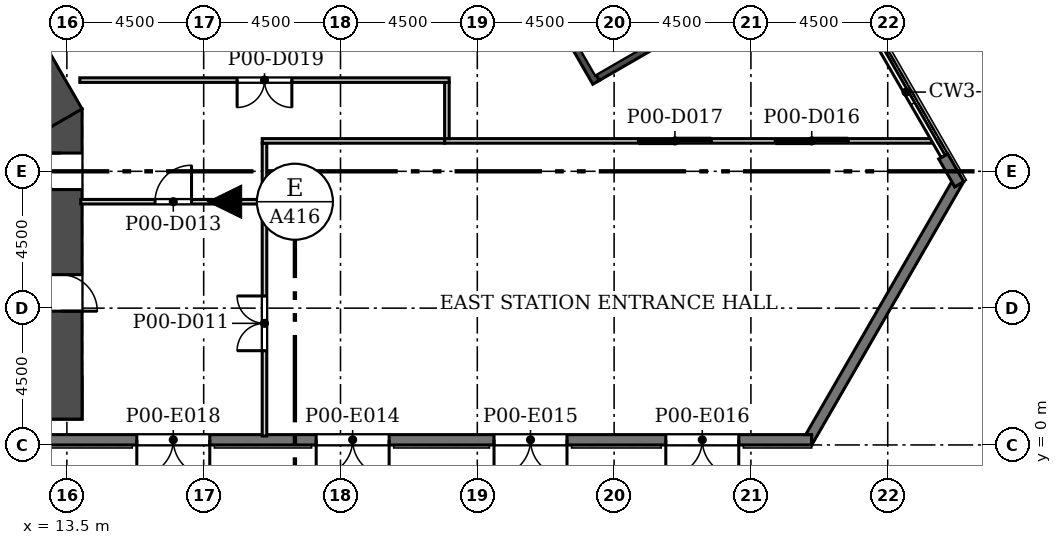
"""IFC4 building model, lengths in metres.
Left out: names, types, materials, properties, quantities, classifications, styles, units other than length and angle.
Written with IfcOpenShell. Run it as: python <this file> out.ifc"""

import sys

from ifc_helpers import new_model, si_unit, direction, frame, frame_2d, origin, place, context, subcontext, project, spatial, polyline, rectangle, outline, extrude, element, fill, save


model = new_model("IFC4")
c1 = context("Model", 3, precision=1e-05, world=origin(), true_north=direction((0.0, 1.0)))
c2 = subcontext(c1, "Body", "Model", "MODEL_VIEW")
j1 = project(units=[si_unit("LENGTHUNIT", "METRE"), si_unit("PLANEANGLEUNIT", "RADIAN")], contexts=[c1])
p1 = place(None, origin())
s1 = spatial("IfcSite", under=j1, at=p1, CompositionType="ELEMENT")
p2 = place(p1, origin())
s2 = spatial("IfcBuilding", under=s1, at=p2, CompositionType="ELEMENT")
p3 = place(p2, origin())
s3 = spatial("IfcBuildingStorey", under=s2, at=p3, CompositionType="ELEMENT", Elevation=0.0)
p4 = place(p3, frame((-14.0, 1.55, 0.0), z_axis=(0.0, 0.0, 1.0), x_axis=(1.0, 0.0, 0.0)))
e1 = element("IfcWall", 1, at=p4, inside=s3, PredefinedType="SHEAR", context=c2, shape_type="SweptSolid", body=[
    extrude(rectangle(XDim=28.0, YDim=1.4, at=frame_2d((14.0, 0.0))), origin(), (0.0, 0.0, 1.0), 8.0),
])
p5 = place(p3, frame((13.3, 0.85, 0.0), z_axis=(0.0, 0.0, 1.0), x_axis=(0.0, 1.0, 0.0)))
e2 = element("IfcWall", 2, at=p5, inside=s3, PredefinedType="SHEAR", context=c2, shape_type="SweptSolid", body=[
    extrude(rectangle(XDim=10.202, YDim=1.4, at=frame_2d((5.101, 0.0))), origin(), (0.0, 0.0, 1.0), 8.0),
])
p6 = place(p5, frame((3.55, 0.0, 0.0)))
e3 = element("IfcOpeningElement", 3, at=p6, cuts=e2, PredefinedType="OPENING", context=c2, shape_type="SweptSolid", body=[
    extrude(rectangle(XDim=1.2, YDim=2.1, at=frame_2d((0.6, 1.05))), frame((0.0, 0.71, 0.0), z_axis=(0.0, -1.0, 0.0), x_axis=(1.0, 0.0, 0.0)), (0.0, 0.0, 1.0), 1.42),
])
p7 = place(p5, frame((7.55, 0.0, 0.0)))
e4 = element("IfcOpeningElement", 4, at=p7, cuts=e2, PredefinedType="OPENING", context=c2, shape_type="SweptSolid", body=[
    extrude(rectangle(XDim=1.2, YDim=2.1, at=frame_2d((0.6, 1.05))), frame((0.0, 0.71, 0.0), z_axis=(0.0, -1.0, 0.0), x_axis=(1.0, 0.0, 0.0)), (0.0, 0.0, 1.0), 1.42),
])
p8 = place(p3, frame((13.394, 10.703, 0.0), z_axis=(0.0, 0.0, 1.0), x_axis=(-0.50000187635, 0.866024320471, 0.0)))
e5 = element("IfcWall", 5, at=p8, inside=s3, PredefinedType="SHEAR", context=c2, shape_type="SweptSolid", body=[
    extrude(rectangle(XDim=9.177, YDim=1.4, at=frame_2d((4.588, 0.0))), origin(), (0.0, 0.0, 1.0), 8.0),
])
p9 = place(p3, frame((-38.0, 0.17, 0.0), z_axis=(0.0, 0.0, 1.0), x_axis=(1.0, 0.0, 0.0)))
e6 = element("IfcWall", 6, at=p9, inside=s3, PredefinedType="SOLIDWALL", context=c2, shape_type="SweptSolid", body=[
    extrude(rectangle(XDim=76.0, YDim=0.34, at=frame_2d((38.0, 0.0))), origin(), (0.0, 0.0, 1.0), 7.7),
])
p10 = place(p9, frame((2.4, 0.0, 0.0)))
e7 = element("IfcOpeningElement", 7, at=p10, cuts=e6, PredefinedType="OPENING", context=c2, shape_type="SweptSolid", body=[
    extrude(rectangle(XDim=2.4, YDim=2.7, at=frame_2d((1.2, 1.35))), frame((0.0, 0.18, 0.0), z_axis=(0.0, -1.0, 0.0), x_axis=(1.0, 0.0, 0.0)), (0.0, 0.0, 1.0), 0.36),
])
p11 = place(p9, frame((8.05, 0.0, 0.0)))
e8 = element("IfcOpeningElement", 8, at=p11, cuts=e6, PredefinedType="OPENING", context=c2, shape_type="SweptSolid", body=[
    extrude(rectangle(XDim=2.4, YDim=2.7, at=frame_2d((1.2, 1.35))), frame((0.0, 0.18, 0.0), z_axis=(0.0, -1.0, 0.0), x_axis=(1.0, 0.0, 0.0)), (0.0, 0.0, 1.0), 0.36),
])
p12 = place(p9, frame((13.9, 0.0, 0.0)))
e9 = element("IfcOpeningElement", 9, at=p12, cuts=e6, PredefinedType="OPENING", context=c2, shape_type="SweptSolid", body=[
    extrude(rectangle(XDim=2.4, YDim=2.7, at=frame_2d((1.2, 1.35))), frame((0.0, 0.18, 0.0), z_axis=(0.0, -1.0, 0.0), x_axis=(1.0, 0.0, 0.0)), (0.0, 0.0, 1.0), 0.36),
])
p13 = place(p9, frame((59.7, 0.0, 0.0)))
e10 = element("IfcOpeningElement", 10, at=p13, cuts=e6, PredefinedType="OPENING", context=c2, shape_type="SweptSolid", body=[
    extrude(rectangle(XDim=2.4, YDim=2.7, at=frame_2d((1.2, 1.35))), frame((0.0, 0.18, 0.0), z_axis=(0.0, -1.0, 0.0), x_axis=(1.0, 0.0, 0.0)), (0.0, 0.0, 1.0), 0.36),
])
p14 = place(p9, frame((65.55, 0.0, 0.0)))
e11 = element("IfcOpeningElement", 11, at=p14, cuts=e6, PredefinedType="OPENING", context=c2, shape_type="SweptSolid", body=[
    extrude(rectangle(XDim=2.4, YDim=2.7, at=frame_2d((1.2, 1.35))), frame((0.0, 0.18, 0.0), z_axis=(0.0, -1.0, 0.0), x_axis=(1.0, 0.0, 0.0)), (0.0, 0.0, 1.0), 0.36),
])
p15 = place(p9, frame((71.2, 0.0, 0.0)))
e12 = element("IfcOpeningElement", 12, at=p15, cuts=e6, PredefinedType="OPENING", context=c2, shape_type="SweptSolid", body=[
    extrude(rectangle(XDim=2.4, YDim=2.7, at=frame_2d((1.2, 1.35))), frame((0.0, 0.18, 0.0), z_axis=(0.0, -1.0, 0.0), x_axis=(1.0, 0.0, 0.0)), (0.0, 0.0, 1.0), 0.36),
])
p16 = place(p9, frame((19.8, 0.0, 0.0)))
e13 = element("IfcOpeningElement", 13, at=p16, cuts=e6, PredefinedType="OPENING", context=c2, shape_type="SweptSolid", body=[
    extrude(rectangle(XDim=2.4, YDim=2.7, at=frame_2d((1.2, 1.35))), frame((0.0, 0.18, 0.0), z_axis=(0.0, -1.0, 0.0), x_axis=(1.0, 0.0, 0.0)), (0.0, 0.0, 1.0), 0.36),
])
p17 = place(p9, frame((53.8, 0.0, 0.0)))
e14 = element("IfcOpeningElement", 14, at=p17, cuts=e6, PredefinedType="OPENING", context=c2, shape_type="SweptSolid", body=[
    extrude(rectangle(XDim=2.4, YDim=2.7, at=frame_2d((1.2, 1.35))), frame((0.0, 0.18, 0.0), z_axis=(0.0, -1.0, 0.0), x_axis=(1.0, 0.0, 0.0)), (0.0, 0.0, 1.0), 0.36),
])
p18 = place(p3, origin())
e15 = element("IfcWall", 15, at=p18, inside=s3, PredefinedType="SOLIDWALL", context=c2, shape_type="SweptSolid", body=[
    extrude(outline(polyline([(38.0, -0.001), (38.0, 0.339), (37.803, 0.339), (42.607, 8.661), (42.706, 8.491), (43.001, 8.661), (43.001, 8.661), (38.0, -0.001), (38.0, -0.001)])), origin(), (0.0, 0.0, 1.0), 7.7),
])
p19 = place(p3, frame((42.853, 8.575, 0.0), z_axis=(0.0, 0.0, 1.0), x_axis=(-0.500062184469, 0.865989498588, 0.0)))
e16 = element("IfcWall", 16, at=p19, inside=s3, PredefinedType="SOLIDWALL", context=c2, shape_type="SweptSolid", body=[
    extrude(rectangle(XDim=1.057, YDim=0.34, at=frame_2d((0.529, 0.0))), origin(), (0.0, 0.0, 1.0), 7.7),
])
p20 = place(p3, frame((20.0, 0.295, 0.0), z_axis=(0.0, 0.0, 1.0), x_axis=(0.0, 1.0, 0.0)))
e17 = element("IfcWall", 17, at=p20, inside=s3, PredefinedType="PARTITIONING", context=c2, shape_type="SweptSolid", body=[
    extrude(rectangle(XDim=7.78, YDim=0.15, at=frame_2d((3.89, 0.0))), origin(), (0.0, 0.0, 1.0), 7.7),
])
p21 = place(p20, frame((2.805, 0.0, 0.0)))
e18 = element("IfcOpeningElement", 18, at=p21, cuts=e17, PredefinedType="OPENING", context=c2, shape_type="SweptSolid", body=[
    extrude(rectangle(XDim=1.8, YDim=2.1, at=frame_2d((0.9, 1.05))), frame((0.0, 0.085, 0.0), z_axis=(0.0, -1.0, 0.0), x_axis=(1.0, 0.0, 0.0)), (0.0, 0.0, 1.0), 0.17),
])
p22 = place(p3, frame((13.955, 8.0, 0.0), z_axis=(0.0, 0.0, 1.0), x_axis=(1.0, 0.0, 0.0)))
e19 = element("IfcWall", 19, at=p22, inside=s3, PredefinedType="PARTITIONING", context=c2, shape_type="SweptSolid", body=[
    extrude(rectangle(XDim=5.97, YDim=0.15, at=frame_2d((2.985, 0.0))), origin(), (0.0, 0.0, 1.0), 7.7),
])
p23 = place(p22, frame((2.445, 0.0, 0.0)))
e20 = element("IfcOpeningElement", 20, at=p23, cuts=e19, PredefinedType="OPENING", context=c2, shape_type="SweptSolid", body=[
    extrude(rectangle(XDim=1.2, YDim=2.1, at=frame_2d((0.6, 1.05))), frame((0.0, 0.085, 0.0), z_axis=(0.0, -1.0, 0.0), x_axis=(1.0, 0.0, 0.0)), (0.0, 0.0, 1.0), 0.17),
])
p24 = place(p3, frame((20.0, 8.075, 0.0), z_axis=(0.0, 0.0, 1.0), x_axis=(0.0, 1.0, 0.0)))
e21 = element("IfcWall", 21, at=p24, inside=s3, PredefinedType="PARTITIONING", context=c2, shape_type="SweptSolid", body=[
    extrude(rectangle(XDim=1.85, YDim=0.15, at=frame_2d((0.925, 0.0))), origin(), (0.0, 0.0, 1.0), 7.7),
])
p25 = place(p3, frame((19.925, 10.0, 0.0), z_axis=(0.0, 0.0, 1.0), x_axis=(1.0, 0.0, 0.0)))
e22 = element("IfcWall", 22, at=p25, inside=s3, PredefinedType="PARTITIONING", context=c2, shape_type="SweptSolid", body=[
    extrude(rectangle(XDim=6.0, YDim=0.15, at=frame_2d((3.0, 0.0))), origin(), (0.0, 0.0, 1.0), 7.7),
])
p26 = place(p3, frame((25.925, 10.0, 0.0), z_axis=(0.0, 0.0, 1.0), x_axis=(1.0, 0.0, 0.0)))
e23 = element("IfcWall", 23, at=p26, inside=s3, PredefinedType="PARTITIONING", context=c2, shape_type="SweptSolid", body=[
    extrude(rectangle(XDim=16.019, YDim=0.15, at=frame_2d((8.009, 0.0))), origin(), (0.0, 0.0, 1.0), 7.7),
])
p27 = place(p26, frame((10.875, 0.0, 0.0)))
e24 = element("IfcOpeningElement", 24, at=p27, cuts=e23, PredefinedType="OPENING", context=c2, shape_type="SweptSolid", body=[
    extrude(rectangle(XDim=2.4, YDim=2.4, at=frame_2d((1.2, 1.2))), frame((0.0, 0.085, 0.0), z_axis=(0.0, -1.0, 0.0), x_axis=(1.0, 0.0, 0.0)), (0.0, 0.0, 1.0), 0.17),
])
p28 = place(p26, frame((6.375, 0.0, 0.0)))
e25 = element("IfcOpeningElement", 25, at=p28, cuts=e23, PredefinedType="OPENING", context=c2, shape_type="SweptSolid", body=[
    extrude(rectangle(XDim=2.4, YDim=2.4, at=frame_2d((1.2, 1.2))), frame((0.0, 0.085, 0.0), z_axis=(0.0, -1.0, 0.0), x_axis=(1.0, 0.0, 0.0)), (0.0, 0.0, 1.0), 0.17),
])
p29 = place(p3, frame((26.0, 11.925, 0.0), z_axis=(0.0, 0.0, 1.0), x_axis=(0.0, -1.0, 0.0)))
e26 = element("IfcWall", 26, at=p29, inside=s3, PredefinedType="PARTITIONING", context=c2, shape_type="SweptSolid", body=[
    extrude(rectangle(XDim=1.85, YDim=0.15, at=frame_2d((0.925, 0.0))), origin(), (0.0, 0.0, 1.0), 7.7),
])
p30 = place(p3, frame((30.907, 11.927, 0.0), z_axis=(0.0, 0.0, 1.0), x_axis=(-0.499985572004, 0.866033733632, 0.0)))
e27 = element("IfcWall", 27, at=p30, inside=s3, PredefinedType="SOLIDWALL", context=c2, shape_type="SweptSolid", body=[
    extrude(rectangle(XDim=7.55, YDim=0.25, at=frame_2d((3.775, 0.0))), origin(), (0.0, 0.0, 1.0), 7.7),
])
p31 = place(p3, frame((13.925, 12.0, 0.0), z_axis=(0.0, 0.0, 1.0), x_axis=(1.0, 0.0, 0.0)))
e28 = element("IfcWall", 28, at=p31, inside=s3, PredefinedType="PARTITIONING", context=c2, shape_type="SweptSolid", body=[
    extrude(rectangle(XDim=12.15, YDim=0.15, at=frame_2d((6.075, 0.0))), origin(), (0.0, 0.0, 1.0), 7.7),
])
p32 = place(p31, frame((5.175, 0.0, 0.0)))
e29 = element("IfcOpeningElement", 29, at=p32, cuts=e28, PredefinedType="OPENING", context=c2, shape_type="SweptSolid", body=[
    extrude(rectangle(XDim=1.8, YDim=2.1, at=frame_2d((0.9, 1.05))), frame((0.0, 0.085, 0.0), z_axis=(0.0, -1.0, 0.0), x_axis=(1.0, 0.0, 0.0)), (0.0, 0.0, 1.0), 0.17),
])
p33 = place(p3, frame((36.452, 15.272, 0.0), z_axis=(0.0, 0.0, 1.0), x_axis=(-0.866041542834, -0.499972045304, 0.0)))
e30 = element("IfcWall", 30, at=p33, inside=s3, PredefinedType="SOLIDWALL", context=c2, shape_type="SweptSolid", body=[
    extrude(rectangle(XDim=6.35, YDim=0.25, at=frame_2d((3.175, 0.0))), origin(), (0.0, 0.0, 1.0), 7.7),
])
p34 = place(p13, frame((2.4, 0.0, 0.0), z_axis=(0.0, 0.0, 1.0), x_axis=(-1.0, 0.0, 0.0)))
e31 = element("IfcDoor", 31, at=p34, inside=s3, OperationType="DOUBLE_DOOR_SINGLE_SWING", PredefinedType="DOOR", context=c2, shape_type="SweptSolid", body=[
    extrude(rectangle(XDim=2.4, YDim=2.7, at=frame_2d((1.2, 1.35))), frame((0.0, 0.025, 0.0), z_axis=(0.0, -1.0, 0.0), x_axis=(1.0, 0.0, 0.0)), (0.0, 0.0, 1.0), 0.05),
])
fill(e10, e31)
p35 = place(p14, frame((2.4, 0.0, 0.0), z_axis=(0.0, 0.0, 1.0), x_axis=(-1.0, 0.0, 0.0)))
e32 = element("IfcDoor", 32, at=p35, inside=s3, OperationType="DOUBLE_DOOR_SINGLE_SWING", PredefinedType="DOOR", context=c2, shape_type="SweptSolid", body=[
    extrude(rectangle(XDim=2.4, YDim=2.7, at=frame_2d((1.2, 1.35))), frame((0.0, 0.025, 0.0), z_axis=(0.0, -1.0, 0.0), x_axis=(1.0, 0.0, 0.0)), (0.0, 0.0, 1.0), 0.05),
])
fill(e11, e32)
p36 = place(p15, frame((2.4, 0.0, 0.0), z_axis=(0.0, 0.0, 1.0), x_axis=(-1.0, 0.0, 0.0)))
e33 = element("IfcDoor", 33, at=p36, inside=s3, OperationType="DOUBLE_DOOR_SINGLE_SWING", PredefinedType="DOOR", context=c2, shape_type="SweptSolid", body=[
    extrude(rectangle(XDim=2.4, YDim=2.7, at=frame_2d((1.2, 1.35))), frame((0.0, 0.025, 0.0), z_axis=(0.0, -1.0, 0.0), x_axis=(1.0, 0.0, 0.0)), (0.0, 0.0, 1.0), 0.05),
])
fill(e12, e33)
p37 = place(p17, frame((2.4, 0.0, 0.0), z_axis=(0.0, 0.0, 1.0), x_axis=(-1.0, 0.0, 0.0)))
e34 = element("IfcDoor", 34, at=p37, inside=s3, OperationType="DOUBLE_DOOR_SINGLE_SWING", PredefinedType="DOOR", context=c2, shape_type="SweptSolid", body=[
    extrude(rectangle(XDim=2.4, YDim=2.7, at=frame_2d((1.2, 1.35))), frame((0.0, 0.025, 0.0), z_axis=(0.0, -1.0, 0.0), x_axis=(1.0, 0.0, 0.0)), (0.0, 0.0, 1.0), 0.05),
])
fill(e14, e34)
p38 = place(p6, frame((1.2, 0.0, 0.0), z_axis=(0.0, 0.0, 1.0), x_axis=(-1.0, 0.0, 0.0)))
e35 = element("IfcDoor", 35, at=p38, inside=s3, OperationType="SINGLE_SWING_RIGHT", PredefinedType="DOOR", context=c2, shape_type="SweptSolid", body=[
    extrude(rectangle(XDim=1.2, YDim=2.1, at=frame_2d((0.6, 1.05))), frame((0.0, 0.425, 0.0), z_axis=(0.0, -1.0, 0.0), x_axis=(1.0, 0.0, 0.0)), (0.0, 0.0, 1.0), 0.05),
])
fill(e3, e35)
p39 = place(p7, origin())
e36 = element("IfcDoor", 36, at=p39, inside=s3, OperationType="SINGLE_SWING_RIGHT", PredefinedType="DOOR", context=c2, shape_type="SweptSolid", body=[
    extrude(rectangle(XDim=1.2, YDim=2.1, at=frame_2d((0.6, 1.05))), frame((0.0, 0.025, 0.0), z_axis=(0.0, -1.0, 0.0), x_axis=(1.0, 0.0, 0.0)), (0.0, 0.0, 1.0), 0.05),
])
fill(e4, e36)
p40 = place(p21, origin())
e37 = element("IfcDoor", 37, at=p40, inside=s3, OperationType="DOUBLE_DOOR_SINGLE_SWING", PredefinedType="DOOR", context=c2, shape_type="SweptSolid", body=[
    extrude(rectangle(XDim=1.8, YDim=2.1, at=frame_2d((0.9, 1.05))), frame((0.0, 0.025, 0.0), z_axis=(0.0, -1.0, 0.0), x_axis=(1.0, 0.0, 0.0)), (0.0, 0.0, 1.0), 0.05),
])
fill(e18, e37)
p41 = place(p23, origin())
e38 = element("IfcDoor", 38, at=p41, inside=s3, OperationType="SINGLE_SWING_RIGHT", PredefinedType="DOOR", context=c2, shape_type="SweptSolid", body=[
    extrude(rectangle(XDim=1.2, YDim=2.1, at=frame_2d((0.6, 1.05))), frame((0.0, 0.025, 0.0), z_axis=(0.0, -1.0, 0.0), x_axis=(1.0, 0.0, 0.0)), (0.0, 0.0, 1.0), 0.05),
])
fill(e20, e38)
p42 = place(p27, origin())
e39 = element("IfcDoor", 39, at=p42, inside=s3, OperationType="DOUBLE_DOOR_SLIDING", PredefinedType="DOOR", context=c2, shape_type="SweptSolid", body=[
    extrude(rectangle(XDim=2.4, YDim=2.4, at=frame_2d((1.2, 1.2))), frame((0.0, 0.025, 0.0), z_axis=(0.0, -1.0, 0.0), x_axis=(1.0, 0.0, 0.0)), (0.0, 0.0, 1.0), 0.05),
])
fill(e24, e39)
p43 = place(p28, origin())
e40 = element("IfcDoor", 40, at=p43, inside=s3, OperationType="DOUBLE_DOOR_SLIDING", PredefinedType="DOOR", context=c2, shape_type="SweptSolid", body=[
    extrude(rectangle(XDim=2.4, YDim=2.4, at=frame_2d((1.2, 1.2))), frame((0.0, 0.025, 0.0), z_axis=(0.0, -1.0, 0.0), x_axis=(1.0, 0.0, 0.0)), (0.0, 0.0, 1.0), 0.05),
])
fill(e25, e40)
p44 = place(p32, frame((1.8, 0.0, 0.0), z_axis=(0.0, 0.0, 1.0), x_axis=(-1.0, 0.0, 0.0)))
e41 = element("IfcDoor", 41, at=p44, inside=s3, OperationType="DOUBLE_DOOR_SINGLE_SWING", PredefinedType="DOOR", context=c2, shape_type="SweptSolid", body=[
    extrude(rectangle(XDim=1.8, YDim=2.1, at=frame_2d((0.9, 1.05))), frame((0.0, 0.025, 0.0), z_axis=(0.0, -1.0, 0.0), x_axis=(1.0, 0.0, 0.0)), (0.0, 0.0, 1.0), 0.05),
])
fill(e29, e41)
save(model, sys.argv[1])
